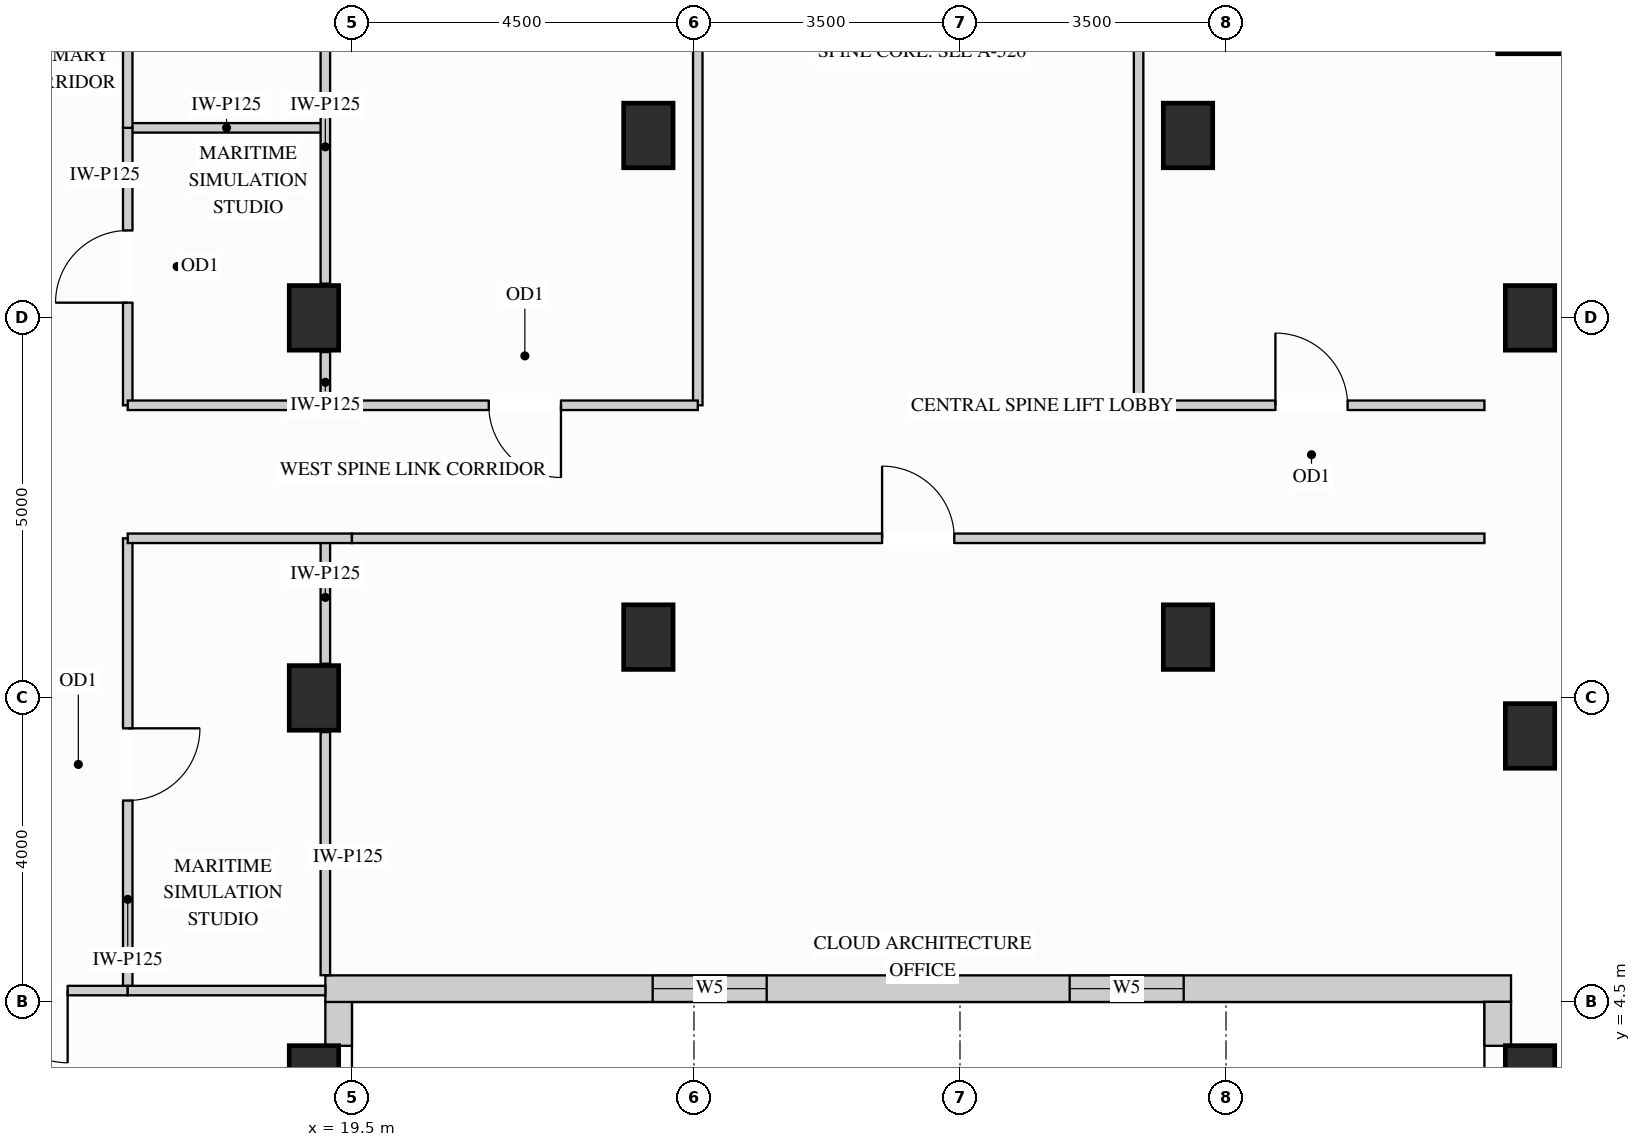
"""IFC4 building model, lengths in metres.
Left out: names, types, materials, properties, quantities, classifications, styles, units other than length and angle.
Written with IfcOpenShell. Run it as: python <this file> out.ifc"""

import sys

from ifc_helpers import new_model, si_unit, direction, frame, frame_2d, origin, origin_2d, place, context, subcontext, project, spatial, rectangle, extrude, source, transform, mapped, element, fill, save


model = new_model("IFC4")
c1 = context("Model", 3, precision=1e-05, world=origin(), true_north=direction((0.0, 1.0)))
c2 = subcontext(c1, "Body", "Model", "MODEL_VIEW")
j1 = project(units=[si_unit("LENGTHUNIT", "METRE"), si_unit("PLANEANGLEUNIT", "RADIAN")], contexts=[c1])
p1 = place(None, origin())
s1 = spatial("IfcSite", under=j1, at=p1, CompositionType="ELEMENT")
p2 = place(p1, origin())
s2 = spatial("IfcBuilding", under=s1, at=p2, CompositionType="ELEMENT")
p3 = place(p2, frame((0.0, 0.0, 212.4)))
s3 = spatial("IfcBuildingStorey", under=s2, at=p3, CompositionType="ELEMENT", Elevation=212.4)
m1 = source(origin(), c2, "Body", "SweptSolid", [
    extrude(rectangle(XDim=0.65, YDim=0.85, at=origin_2d()), origin(), (0.0, 0.0, 1.0), 3.4),
])
for number, where, z_axis, x_axis in (
    (1, (19.0, 13.5, 0.0), (0.0, 0.0, 1.0), (1.0, 0.0, 0.0)),
    (2, (19.0, 3.5, 0.0), (0.0, 0.0, 1.0), (1.0, 0.0, 0.0)),
    (3, (19.0, 8.5, 0.0), (0.0, 0.0, 1.0), (1.0, 0.0, 0.0)),
    (4, (35.0, 13.5, 0.0), (0.0, 0.0, 1.0), (1.0, 0.0, 0.0)),
    (5, (35.0, 3.5, 0.0), (0.0, 0.0, 1.0), (1.0, 0.0, 0.0)),
    (6, (35.0, 8.0, 0.0), (0.0, 0.0, 1.0), (1.0, 0.0, 0.0)),
    (7, (23.4, 15.9, 0.0), (0.0, 0.0, 1.0), (1.0, 0.0, 0.0)),
    (8, (23.4, 9.3, 0.0), (0.0, 0.0, 1.0), (1.0, 0.0, 0.0)),
    (9, (30.5, 15.9, 0.0), (0.0, 0.0, 1.0), (1.0, 0.0, 0.0)),
    (10, (30.5, 9.3, 0.0), (0.0, 0.0, 1.0), (1.0, 0.0, 0.0)),
):
    element("IfcColumn", number, at=place(p3, frame(where, z_axis=z_axis, x_axis=x_axis)), inside=s3, PredefinedType="COLUMN", context=c2, shape_type="MappedRepresentation", body=[
        mapped(m1, transform((0.0, 0.0, 0.0), x_axis=(1.0, 0.0, 0.0), y_axis=(0.0, 1.0, 0.0), z_axis=(0.0, 0.0, 1.0))),
    ])
m2 = source(origin(), c2, "Body", "SweptSolid", [
    extrude(rectangle(XDim=0.85, YDim=0.85, at=origin_2d()), origin(), (0.0, 0.0, 1.0), 3.4),
])
p4 = place(p3, frame((35.0, 17.4, 0.0), z_axis=(0.0, 0.0, 1.0), x_axis=(1.0, 0.0, 0.0)))
e11 = element("IfcColumn", 11, at=p4, inside=s3, PredefinedType="COLUMN", context=c2, shape_type="MappedRepresentation", body=[
    mapped(m2, transform((0.0, 0.0, 0.0), x_axis=(1.0, 0.0, 0.0), y_axis=(0.0, 1.0, 0.0), z_axis=(0.0, 0.0, 1.0))),
])
m3 = source(origin(), c2, "Body", "SweptSolid", [
    extrude(rectangle(XDim=0.579, YDim=0.35, at=frame_2d((0.29, 0.0))), origin(), (0.0, 0.0, 1.0), 2.773),
])
p5 = place(p3, frame((19.325, 3.923, 0.0), z_axis=(0.0, 0.0, 1.0), x_axis=(0.0, 1.0, 0.0)))
e12 = element("IfcWall", 12, at=p5, inside=s3, PredefinedType="SOLIDWALL", context=c2, shape_type="MappedRepresentation", body=[
    mapped(m3, transform((0.0, 0.0, 0.0), x_axis=(1.0, 0.0, 0.0), y_axis=(0.0, 1.0, 0.0), z_axis=(0.0, 0.0, 1.0))),
])
p6 = place(p3, frame((19.15, 4.675, 0.0), z_axis=(0.0, 0.0, 1.0), x_axis=(1.0, 0.0, 0.0)))
e13 = element("IfcWall", 13, at=p6, inside=s3, PredefinedType="SOLIDWALL", context=c2, shape_type="SweptSolid", body=[
    extrude(rectangle(XDim=15.6, YDim=0.35, at=frame_2d((7.8, 0.0))), origin(), (0.0, 0.0, 1.0), 3.385),
])
p7 = place(p6, frame((4.307, 0.0, 0.78)))
e14 = element("IfcOpeningElement", 14, at=p7, cuts=e13, PredefinedType="OPENING", context=c2, shape_type="SweptSolid", body=[
    extrude(rectangle(XDim=1.5, YDim=2.0, at=frame_2d((0.75, 1.0))), frame((0.0, 0.185, 0.0), z_axis=(0.0, -1.0, 0.0), x_axis=(1.0, 0.0, 0.0)), (0.0, 0.0, 1.0), 0.37),
])
p8 = place(p6, frame((9.793, 0.0, 0.78)))
e15 = element("IfcOpeningElement", 15, at=p8, cuts=e13, PredefinedType="OPENING", context=c2, shape_type="SweptSolid", body=[
    extrude(rectangle(XDim=1.5, YDim=2.0, at=frame_2d((0.75, 1.0))), frame((0.0, 0.185, 0.0), z_axis=(0.0, -1.0, 0.0), x_axis=(1.0, 0.0, 0.0)), (0.0, 0.0, 1.0), 0.37),
])
m4 = source(origin(), c2, "Body", "SweptSolid", [
    extrude(rectangle(XDim=0.579, YDim=0.35, at=frame_2d((0.29, 0.0))), origin(), (0.0, 0.0, 1.0), 3.385),
])
p9 = place(p3, frame((34.575, 4.502, 0.0), z_axis=(0.0, 0.0, 1.0), x_axis=(0.0, -1.0, 0.0)))
e16 = element("IfcWall", 16, at=p9, inside=s3, PredefinedType="SOLIDWALL", context=c2, shape_type="MappedRepresentation", body=[
    mapped(m4, transform((0.0, 0.0, 0.0), x_axis=(1.0, 0.0, 0.0), y_axis=(0.0, 1.0, 0.0), z_axis=(0.0, 0.0, 1.0))),
])
m5 = source(origin(), c2, "Body", "SweptSolid", [
    extrude(rectangle(XDim=2.6, YDim=0.125, at=frame_2d((1.3, 0.0))), origin(), (0.0, 0.0, 1.0), 3.385),
])
p10 = place(p3, frame((16.55, 16.0, 0.0), z_axis=(0.0, 0.0, 1.0), x_axis=(1.0, 0.0, 0.0)))
e17 = element("IfcWall", 17, at=p10, inside=s3, PredefinedType="PARTITIONING", context=c2, shape_type="MappedRepresentation", body=[
    mapped(m5, transform((0.0, 0.0, 0.0), x_axis=(1.0, 0.0, 0.0), y_axis=(0.0, 1.0, 0.0), z_axis=(0.0, 0.0, 1.0))),
])
m6 = source(origin(), c2, "Body", "SweptSolid", [
    extrude(rectangle(XDim=0.7, YDim=0.125, at=frame_2d((0.35, 0.0))), origin(), (0.0, 0.0, 1.0), 2.773),
])
p11 = place(p3, frame((19.15, 12.35, 0.0), z_axis=(0.0, 0.0, 1.0), x_axis=(0.0, 1.0, 0.0)))
e18 = element("IfcWall", 18, at=p11, inside=s3, PredefinedType="PARTITIONING", context=c2, shape_type="MappedRepresentation", body=[
    mapped(m6, transform((0.0, 0.0, 0.0), x_axis=(1.0, 0.0, 0.0), y_axis=(0.0, 1.0, 0.0), z_axis=(0.0, 0.0, 1.0))),
])
m7 = source(origin(), c2, "Body", "SweptSolid", [
    extrude(rectangle(XDim=3.6, YDim=0.125, at=frame_2d((1.8, 0.0))), origin(), (0.0, 0.0, 1.0), 2.773),
])
p12 = place(p3, frame((19.15, 13.95, 0.0), z_axis=(0.0, 0.0, 1.0), x_axis=(0.0, 1.0, 0.0)))
e19 = element("IfcWall", 19, at=p12, inside=s3, PredefinedType="PARTITIONING", context=c2, shape_type="MappedRepresentation", body=[
    mapped(m7, transform((0.0, 0.0, 0.0), x_axis=(1.0, 0.0, 0.0), y_axis=(0.0, 1.0, 0.0), z_axis=(0.0, 0.0, 1.0))),
])
m8 = source(origin(), c2, "Body", "SweptSolid", [
    extrude(rectangle(XDim=3.198, YDim=0.125, at=frame_2d((1.599, 0.0))), origin(), (0.0, 0.0, 1.0), 2.773),
])
p13 = place(p3, frame((19.15, 4.852, 0.0), z_axis=(0.0, 0.0, 1.0), x_axis=(0.0, 1.0, 0.0)))
e20 = element("IfcWall", 20, at=p13, inside=s3, PredefinedType="PARTITIONING", context=c2, shape_type="MappedRepresentation", body=[
    mapped(m8, transform((0.0, 0.0, 0.0), x_axis=(1.0, 0.0, 0.0), y_axis=(0.0, 1.0, 0.0), z_axis=(0.0, 0.0, 1.0))),
])
m9 = source(origin(), c2, "Body", "SweptSolid", [
    extrude(rectangle(XDim=1.65, YDim=0.125, at=frame_2d((0.825, 0.0))), origin(), (0.0, 0.0, 1.0), 2.773),
])
p14 = place(p3, frame((19.15, 8.95, 0.0), z_axis=(0.0, 0.0, 1.0), x_axis=(0.0, 1.0, 0.0)))
e21 = element("IfcWall", 21, at=p14, inside=s3, PredefinedType="PARTITIONING", context=c2, shape_type="MappedRepresentation", body=[
    mapped(m9, transform((0.0, 0.0, 0.0), x_axis=(1.0, 0.0, 0.0), y_axis=(0.0, 1.0, 0.0), z_axis=(0.0, 0.0, 1.0))),
])
p15 = place(p3, frame((16.55, 12.35, 0.0), z_axis=(0.0, 0.0, 1.0), x_axis=(0.0, 1.0, 0.0)))
e22 = element("IfcWall", 22, at=p15, inside=s3, PredefinedType="PARTITIONING", context=c2, shape_type="SweptSolid", body=[
    extrude(rectangle(XDim=3.65, YDim=0.125, at=frame_2d((1.825, 0.0))), origin(), (0.0, 0.0, 1.0), 3.385),
])
p16 = place(p15, frame((1.35, 0.0, 0.0)))
e23 = element("IfcOpeningElement", 23, at=p16, cuts=e22, PredefinedType="OPENING", context=c2, shape_type="SweptSolid", body=[
    extrude(rectangle(XDim=0.95, YDim=2.15, at=frame_2d((0.475, 1.075))), frame((0.0, 0.073, 0.0), z_axis=(0.0, -1.0, 0.0), x_axis=(1.0, 0.0, 0.0)), (0.0, 0.0, 1.0), 0.145),
])
p17 = place(p3, frame((16.55, 16.0, 0.0), z_axis=(0.0, 0.0, 1.0), x_axis=(0.0, 1.0, 0.0)))
e24 = element("IfcWall", 24, at=p17, inside=s3, PredefinedType="PARTITIONING", context=c2, shape_type="SweptSolid", body=[
    extrude(rectangle(XDim=7.35, YDim=0.125, at=frame_2d((3.675, 0.0))), origin(), (0.0, 0.0, 1.0), 3.385),
])
p18 = place(p17, frame((3.2, 0.0, 0.0)))
e25 = element("IfcOpeningElement", 25, at=p18, cuts=e24, PredefinedType="OPENING", context=c2, shape_type="SweptSolid", body=[
    extrude(rectangle(XDim=0.95, YDim=2.15, at=frame_2d((0.475, 1.075))), frame((0.0, 0.073, 0.0), z_axis=(0.0, -1.0, 0.0), x_axis=(1.0, 0.0, 0.0)), (0.0, 0.0, 1.0), 0.145),
])
p19 = place(p3, frame((16.55, 4.65, 0.0), z_axis=(0.0, 0.0, 1.0), x_axis=(0.0, 1.0, 0.0)))
e26 = element("IfcWall", 26, at=p19, inside=s3, PredefinedType="PARTITIONING", context=c2, shape_type="SweptSolid", body=[
    extrude(rectangle(XDim=5.95, YDim=0.125, at=frame_2d((2.975, 0.0))), origin(), (0.0, 0.0, 1.0), 3.385),
])
p20 = place(p19, frame((2.5, 0.0, 0.0)))
e27 = element("IfcOpeningElement", 27, at=p20, cuts=e26, PredefinedType="OPENING", context=c2, shape_type="SweptSolid", body=[
    extrude(rectangle(XDim=0.95, YDim=2.15, at=frame_2d((0.475, 1.075))), frame((0.0, 0.073, 0.0), z_axis=(0.0, -1.0, 0.0), x_axis=(1.0, 0.0, 0.0)), (0.0, 0.0, 1.0), 0.145),
])
m10 = source(origin(), c2, "Body", "SweptSolid", [
    extrude(rectangle(XDim=5.298, YDim=0.125, at=frame_2d((2.649, 0.0))), origin(), (0.0, 0.0, 1.0), 3.385),
])
for number, where, z_axis, x_axis in (
    (28, (24.05, 12.35, 0.0), (0.0, 0.0, 1.0), (0.0, 1.0, 0.0)),
    (29, (29.85, 12.35, 0.0), (0.0, 0.0, 1.0), (0.0, 1.0, 0.0)),
):
    element("IfcWall", number, at=place(p3, frame(where, z_axis=z_axis, x_axis=x_axis)), inside=s3, PredefinedType="PARTITIONING", context=c2, shape_type="MappedRepresentation", body=[
        mapped(m10, transform((0.0, 0.0, 0.0), x_axis=(1.0, 0.0, 0.0), y_axis=(0.0, 1.0, 0.0), z_axis=(0.0, 0.0, 1.0))),
    ])
p21 = place(p3, frame((29.85, 12.35, 0.0), z_axis=(0.0, 0.0, 1.0), x_axis=(1.0, 0.0, 0.0)))
e30 = element("IfcWall", 30, at=p21, inside=s3, PredefinedType="PARTITIONING", context=c2, shape_type="SweptSolid", body=[
    extrude(rectangle(XDim=4.55, YDim=0.125, at=frame_2d((2.275, 0.0))), origin(), (0.0, 0.0, 1.0), 3.385),
])
p22 = place(p21, frame((1.8, 0.0, 0.0)))
e31 = element("IfcOpeningElement", 31, at=p22, cuts=e30, PredefinedType="OPENING", context=c2, shape_type="SweptSolid", body=[
    extrude(rectangle(XDim=0.95, YDim=2.15, at=frame_2d((0.475, 1.075))), frame((0.0, 0.073, 0.0), z_axis=(0.0, -1.0, 0.0), x_axis=(1.0, 0.0, 0.0)), (0.0, 0.0, 1.0), 0.145),
])
m11 = source(origin(), c2, "Body", "SweptSolid", [
    extrude(rectangle(XDim=2.95, YDim=0.125, at=frame_2d((1.475, 0.0))), origin(), (0.0, 0.0, 1.0), 3.385),
])
p23 = place(p3, frame((16.55, 12.35, 0.0), z_axis=(0.0, 0.0, 1.0), x_axis=(1.0, 0.0, 0.0)))
e32 = element("IfcWall", 32, at=p23, inside=s3, PredefinedType="PARTITIONING", context=c2, shape_type="MappedRepresentation", body=[
    mapped(m11, transform((0.0, 0.0, 0.0), x_axis=(1.0, 0.0, 0.0), y_axis=(0.0, 1.0, 0.0), z_axis=(0.0, 0.0, 1.0))),
])
p24 = place(p3, frame((19.5, 12.35, 0.0), z_axis=(0.0, 0.0, 1.0), x_axis=(1.0, 0.0, 0.0)))
e33 = element("IfcWall", 33, at=p24, inside=s3, PredefinedType="PARTITIONING", context=c2, shape_type="SweptSolid", body=[
    extrude(rectangle(XDim=4.55, YDim=0.125, at=frame_2d((2.275, 0.0))), origin(), (0.0, 0.0, 1.0), 3.385),
])
p25 = place(p24, frame((1.8, 0.0, 0.0)))
e34 = element("IfcOpeningElement", 34, at=p25, cuts=e33, PredefinedType="OPENING", context=c2, shape_type="SweptSolid", body=[
    extrude(rectangle(XDim=0.95, YDim=2.15, at=frame_2d((0.475, 1.075))), frame((0.0, 0.073, 0.0), z_axis=(0.0, -1.0, 0.0), x_axis=(1.0, 0.0, 0.0)), (0.0, 0.0, 1.0), 0.145),
])
p26 = place(p3, frame((16.55, 10.6, 0.0), z_axis=(0.0, 0.0, 1.0), x_axis=(1.0, 0.0, 0.0)))
e35 = element("IfcWall", 35, at=p26, inside=s3, PredefinedType="PARTITIONING", context=c2, shape_type="MappedRepresentation", body=[
    mapped(m11, transform((0.0, 0.0, 0.0), x_axis=(1.0, 0.0, 0.0), y_axis=(0.0, 1.0, 0.0), z_axis=(0.0, 0.0, 1.0))),
])
p27 = place(p3, frame((19.5, 10.6, 0.0), z_axis=(0.0, 0.0, 1.0), x_axis=(1.0, 0.0, 0.0)))
e36 = element("IfcWall", 36, at=p27, inside=s3, PredefinedType="PARTITIONING", context=c2, shape_type="SweptSolid", body=[
    extrude(rectangle(XDim=14.9, YDim=0.125, at=frame_2d((7.45, 0.0))), origin(), (0.0, 0.0, 1.0), 3.385),
])
p28 = place(p27, frame((6.975, 0.0, 0.0)))
e37 = element("IfcOpeningElement", 37, at=p28, cuts=e36, PredefinedType="OPENING", context=c2, shape_type="SweptSolid", body=[
    extrude(rectangle(XDim=0.95, YDim=2.15, at=frame_2d((0.475, 1.075))), frame((0.0, 0.073, 0.0), z_axis=(0.0, -1.0, 0.0), x_axis=(1.0, 0.0, 0.0)), (0.0, 0.0, 1.0), 0.145),
])
p29 = place(p3, frame((14.019, 4.65, 0.0), z_axis=(0.0, 0.0, 1.0), x_axis=(1.0, 0.0, 0.0)))
e38 = element("IfcWall", 38, at=p29, inside=s3, PredefinedType="PARTITIONING", context=c2, shape_type="SweptSolid", body=[
    extrude(rectangle(XDim=2.531, YDim=0.125, at=frame_2d((1.266, 0.0))), origin(), (0.0, 0.0, 1.0), 2.848),
])
p30 = place(p29, frame((0.791, 0.0, 0.0)))
e39 = element("IfcOpeningElement", 39, at=p30, cuts=e38, PredefinedType="OPENING", context=c2, shape_type="SweptSolid", body=[
    extrude(rectangle(XDim=0.95, YDim=2.15, at=frame_2d((0.475, 1.075))), frame((0.0, 0.073, 0.0), z_axis=(0.0, -1.0, 0.0), x_axis=(1.0, 0.0, 0.0)), (0.0, 0.0, 1.0), 0.145),
])
m12 = source(origin(), c2, "Body", "SweptSolid", [
    extrude(rectangle(XDim=2.6, YDim=0.125, at=frame_2d((1.3, 0.0))), origin(), (0.0, 0.0, 1.0), 2.848),
])
p31 = place(p3, frame((16.55, 4.65, 0.0), z_axis=(0.0, 0.0, 1.0), x_axis=(1.0, 0.0, 0.0)))
e40 = element("IfcWall", 40, at=p31, inside=s3, PredefinedType="PARTITIONING", context=c2, shape_type="MappedRepresentation", body=[
    mapped(m12, transform((0.0, 0.0, 0.0), x_axis=(1.0, 0.0, 0.0), y_axis=(0.0, 1.0, 0.0), z_axis=(0.0, 0.0, 1.0))),
])
m13 = source(origin(), c2, "Body", "SweptSolid", [
    extrude(rectangle(XDim=0.95, YDim=2.15, at=frame_2d((0.475, 1.075))), frame((0.0, 0.025, 0.0), z_axis=(0.0, -1.0, 0.0), x_axis=(1.0, 0.0, 0.0)), (0.0, 0.0, 1.0), 0.05),
])
p32 = place(p20, origin())
e41 = element("IfcDoor", 41, at=p32, inside=s3, OperationType="SINGLE_SWING_RIGHT", PredefinedType="DOOR", context=c2, shape_type="MappedRepresentation", body=[
    mapped(m13, transform((0.0, 0.0, 0.0), x_axis=(1.0, 0.0, 0.0), y_axis=(0.0, 1.0, 0.0), z_axis=(0.0, 0.0, 1.0))),
])
fill(e27, e41)
p33 = place(p16, origin())
e42 = element("IfcDoor", 42, at=p33, inside=s3, OperationType="SINGLE_SWING_LEFT", PredefinedType="DOOR", context=c2, shape_type="MappedRepresentation", body=[
    mapped(m13, transform((0.0, 0.0, 0.0), x_axis=(1.0, 0.0, 0.0), y_axis=(0.0, 1.0, 0.0), z_axis=(0.0, 0.0, 1.0))),
])
fill(e23, e42)
p34 = place(p30, origin())
e43 = element("IfcDoor", 43, at=p34, inside=s3, OperationType="SINGLE_SWING_RIGHT", PredefinedType="DOOR", context=c2, shape_type="MappedRepresentation", body=[
    mapped(m13, transform((0.0, 0.0, 0.0), x_axis=(1.0, 0.0, 0.0), y_axis=(0.0, 1.0, 0.0), z_axis=(0.0, 0.0, 1.0))),
])
fill(e39, e43)
p35 = place(p25, origin())
e44 = element("IfcDoor", 44, at=p35, inside=s3, OperationType="SINGLE_SWING_RIGHT", PredefinedType="DOOR", context=c2, shape_type="MappedRepresentation", body=[
    mapped(m13, transform((0.0, 0.0, 0.0), x_axis=(1.0, 0.0, 0.0), y_axis=(0.0, 1.0, 0.0), z_axis=(0.0, 0.0, 1.0))),
])
fill(e34, e44)
p36 = place(p22, origin())
e45 = element("IfcDoor", 45, at=p36, inside=s3, OperationType="SINGLE_SWING_LEFT", PredefinedType="DOOR", context=c2, shape_type="MappedRepresentation", body=[
    mapped(m13, transform((0.0, 0.0, 0.0), x_axis=(1.0, 0.0, 0.0), y_axis=(0.0, 1.0, 0.0), z_axis=(0.0, 0.0, 1.0))),
])
fill(e31, e45)
p37 = place(p28, origin())
e46 = element("IfcDoor", 46, at=p37, inside=s3, OperationType="SINGLE_SWING_LEFT", PredefinedType="DOOR", context=c2, shape_type="MappedRepresentation", body=[
    mapped(m13, transform((0.0, 0.0, 0.0), x_axis=(1.0, 0.0, 0.0), y_axis=(0.0, 1.0, 0.0), z_axis=(0.0, 0.0, 1.0))),
])
fill(e37, e46)
m14 = source(origin(), c2, "Body", "SweptSolid", [
    extrude(rectangle(XDim=1.5, YDim=2.0, at=frame_2d((0.75, 1.0))), frame((0.0, 0.03, 0.0), z_axis=(0.0, -1.0, 0.0), x_axis=(1.0, 0.0, 0.0)), (0.0, 0.0, 1.0), 0.06),
])
p38 = place(p7, origin())
e47 = element("IfcWindow", 47, at=p38, inside=s3, PartitioningType="SINGLE_PANEL", PredefinedType="WINDOW", context=c2, shape_type="MappedRepresentation", body=[
    mapped(m14, transform((0.0, 0.0, 0.0), x_axis=(1.0, 0.0, 0.0), y_axis=(0.0, 1.0, 0.0), z_axis=(0.0, 0.0, 1.0))),
])
fill(e14, e47)
p39 = place(p8, origin())
e48 = element("IfcWindow", 48, at=p39, inside=s3, PartitioningType="SINGLE_PANEL", PredefinedType="WINDOW", context=c2, shape_type="MappedRepresentation", body=[
    mapped(m14, transform((0.0, 0.0, 0.0), x_axis=(1.0, 0.0, 0.0), y_axis=(0.0, 1.0, 0.0), z_axis=(0.0, 0.0, 1.0))),
])
fill(e15, e48)
save(model, sys.argv[1])
